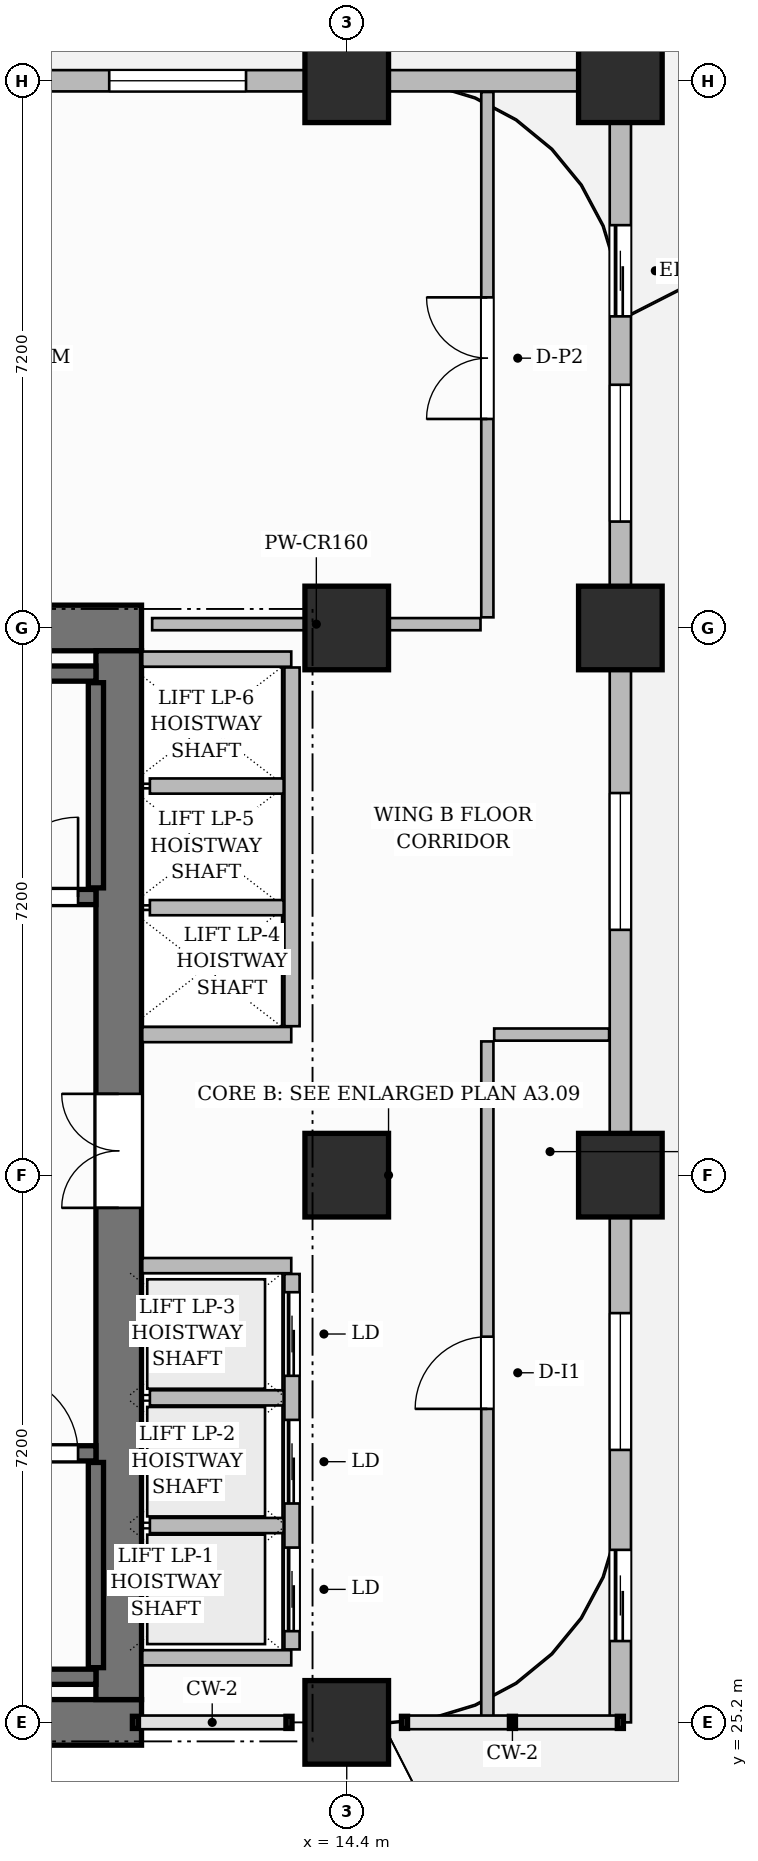
"""IFC4 building model, lengths in metres.
Left out: names, types, materials, properties, quantities, classifications, styles, units other than length and angle.
Written with IfcOpenShell. Run it as: python <this file> out.ifc"""

import sys

from ifc_helpers import new_model, si_unit, direction, frame, frame_2d, origin, origin_2d, place, context, subcontext, project, spatial, rectangle, extrude, source, transform, mapped, element, fill, save


model = new_model("IFC4")
c1 = context("Model", 3, precision=1e-05, world=origin(), true_north=direction((0.0, 1.0)))
c2 = subcontext(c1, "Body", "Model", "MODEL_VIEW")
j1 = project(units=[si_unit("LENGTHUNIT", "METRE"), si_unit("PLANEANGLEUNIT", "RADIAN")], contexts=[c1])
p1 = place(None, origin())
s1 = spatial("IfcSite", under=j1, at=p1, CompositionType="ELEMENT")
p2 = place(p1, origin())
s2 = spatial("IfcBuilding", under=s1, at=p2, CompositionType="ELEMENT")
p3 = place(p2, frame((0.0, 0.0, 58.3)))
s3 = spatial("IfcBuildingStorey", under=s2, at=p3, CompositionType="ELEMENT", Elevation=58.3)
for number, where, z_axis, x_axis in (
    (1, (3.3, 25.2, 0.0), (0.0, 0.0, 1.0), (1.0, 0.0, 0.0)),
    (2, (3.3, 39.6, 0.0), (0.0, 0.0, 1.0), (1.0, 0.0, 0.0)),
):
    element("IfcWall", number, at=place(p3, frame(where, z_axis=z_axis, x_axis=x_axis)), inside=s3, PredefinedType="SHEAR", context=c2, shape_type="SweptSolid", body=[
        extrude(rectangle(XDim=8.4, YDim=0.6, at=frame_2d((4.2, 0.0))), origin(), (0.0, 0.0, 1.0), 3.7),
    ])
p4 = place(p3, frame((11.4, 25.5, 0.0), z_axis=(0.0, 0.0, 1.0), x_axis=(0.0, 1.0, 0.0)))
e3 = element("IfcWall", 3, at=p4, inside=s3, PredefinedType="SHEAR", context=c2, shape_type="SweptSolid", body=[
    extrude(rectangle(XDim=13.8, YDim=0.6, at=frame_2d((6.9, 0.0))), origin(), (0.0, 0.0, 1.0), 3.7),
])
p5 = place(p4, frame((6.47, 0.0, 0.0)))
e4 = element("IfcOpeningElement", 4, at=p5, cuts=e3, PredefinedType="OPENING", context=c2, shape_type="SweptSolid", body=[
    extrude(rectangle(XDim=1.5, YDim=2.2, at=frame_2d((0.75, 1.1))), frame((0.0, 0.31, 0.0), z_axis=(0.0, -1.0, 0.0), x_axis=(1.0, 0.0, 0.0)), (0.0, 0.0, 1.0), 0.62),
])
m1 = source(origin(), c2, "Body", "SweptSolid", [
    extrude(rectangle(XDim=1.1, YDim=1.1, at=origin_2d()), origin(), (0.0, 0.0, 1.0), 3.7),
])
for number, where, z_axis, x_axis in (
    (5, (14.4, 25.2, 0.0), (0.0, 0.0, 1.0), (1.0, 0.0, 0.0)),
    (6, (14.4, 32.4, 0.0), (0.0, 0.0, 1.0), (1.0, 0.0, 0.0)),
    (7, (14.4, 39.6, 0.0), (0.0, 0.0, 1.0), (1.0, 0.0, 0.0)),
    (8, (14.4, 46.8, 0.0), (0.0, 0.0, 1.0), (1.0, 0.0, 0.0)),
    (9, (18.0, 32.4, 0.0), (0.0, 0.0, 1.0), (1.0, 0.0, 0.0)),
    (10, (18.0, 39.6, 0.0), (0.0, 0.0, 1.0), (1.0, 0.0, 0.0)),
    (11, (18.0, 46.8, 0.0), (0.0, 0.0, 1.0), (1.0, 0.0, 0.0)),
):
    element("IfcColumn", number, at=place(p3, frame(where, z_axis=z_axis, x_axis=x_axis)), inside=s3, PredefinedType="COLUMN", context=c2, shape_type="MappedRepresentation", body=[
        mapped(m1, transform((0.0, 0.0, 0.0), scale=1.0)),
    ])
p6 = place(p3, frame((4.0, 25.8, 0.0), z_axis=(0.0, 0.0, 1.0), x_axis=(1.0, 0.0, 0.0)))
e12 = element("IfcWall", 12, at=p6, inside=s3, PredefinedType="SHEAR", context=c2, shape_type="SweptSolid", body=[
    extrude(rectangle(XDim=7.1, YDim=0.2, at=frame_2d((3.55, 0.0))), origin(), (0.0, 0.0, 1.0), 3.7),
])
p7 = place(p3, frame((11.1, 25.92, 0.0), z_axis=(0.0, 0.0, 1.0), x_axis=(0.0, 1.0, 0.0)))
e13 = element("IfcWall", 13, at=p7, inside=s3, PredefinedType="SHEAR", context=c2, shape_type="SweptSolid", body=[
    extrude(rectangle(XDim=2.7, YDim=0.2, at=frame_2d((1.35, 0.0))), origin(), (0.0, 0.0, 1.0), 3.7),
])
p8 = place(p3, frame((4.0, 28.74, 0.0), z_axis=(0.0, 0.0, 1.0), x_axis=(1.0, 0.0, 0.0)))
e14 = element("IfcWall", 14, at=p8, inside=s3, PredefinedType="SHEAR", context=c2, shape_type="SweptSolid", body=[
    extrude(rectangle(XDim=7.1, YDim=0.2, at=frame_2d((3.55, 0.0))), origin(), (0.0, 0.0, 1.0), 3.7),
])
p9 = place(p8, frame((5.815, 0.0, 0.0)))
e15 = element("IfcOpeningElement", 15, at=p9, cuts=e14, PredefinedType="OPENING", context=c2, shape_type="SweptSolid", body=[
    extrude(rectangle(XDim=1.05, YDim=2.2, at=frame_2d((0.525, 1.1))), frame((0.0, 0.11, 0.0), z_axis=(0.0, -1.0, 0.0), x_axis=(1.0, 0.0, 0.0)), (0.0, 0.0, 1.0), 0.22),
])
p10 = place(p3, frame((4.0, 39.0, 0.0), z_axis=(0.0, 0.0, 1.0), x_axis=(1.0, 0.0, 0.0)))
e16 = element("IfcWall", 16, at=p10, inside=s3, PredefinedType="SHEAR", context=c2, shape_type="SweptSolid", body=[
    extrude(rectangle(XDim=7.1, YDim=0.2, at=frame_2d((3.55, 0.0))), origin(), (0.0, 0.0, 1.0), 3.7),
])
p11 = place(p3, frame((11.1, 36.18, 0.0), z_axis=(0.0, 0.0, 1.0), x_axis=(0.0, 1.0, 0.0)))
e17 = element("IfcWall", 17, at=p11, inside=s3, PredefinedType="SHEAR", context=c2, shape_type="SweptSolid", body=[
    extrude(rectangle(XDim=2.7, YDim=0.2, at=frame_2d((1.35, 0.0))), origin(), (0.0, 0.0, 1.0), 3.7),
])
p12 = place(p3, frame((4.0, 36.06, 0.0), z_axis=(0.0, 0.0, 1.0), x_axis=(1.0, 0.0, 0.0)))
e18 = element("IfcWall", 18, at=p12, inside=s3, PredefinedType="SHEAR", context=c2, shape_type="SweptSolid", body=[
    extrude(rectangle(XDim=7.1, YDim=0.2, at=frame_2d((3.55, 0.0))), origin(), (0.0, 0.0, 1.0), 3.7),
])
p13 = place(p12, frame((5.815, 0.0, 0.0)))
e19 = element("IfcOpeningElement", 19, at=p13, cuts=e18, PredefinedType="OPENING", context=c2, shape_type="SweptSolid", body=[
    extrude(rectangle(XDim=1.05, YDim=2.2, at=frame_2d((0.525, 1.1))), frame((0.0, 0.11, 0.0), z_axis=(0.0, -1.0, 0.0), x_axis=(1.0, 0.0, 0.0)), (0.0, 0.0, 1.0), 0.22),
])
for number, where, z_axis, x_axis in (
    (20, (11.71, 26.05, 0.0), (0.0, 0.0, 1.0), (1.0, 0.0, 0.0)),
    (21, (11.71, 31.21, 0.0), (0.0, 0.0, 1.0), (1.0, 0.0, 0.0)),
):
    element("IfcWall", number, at=place(p3, frame(where, z_axis=z_axis, x_axis=x_axis)), inside=s3, PredefinedType="PARTITIONING", context=c2, shape_type="SweptSolid", body=[
        extrude(rectangle(XDim=1.96, YDim=0.2, at=frame_2d((0.98, 0.0))), origin(), (0.0, 0.0, 1.0), 3.45),
    ])
p14 = place(p3, frame((13.68, 26.16, 0.0), z_axis=(0.0, 0.0, 1.0), x_axis=(0.0, 1.0, 0.0)))
e22 = element("IfcWall", 22, at=p14, inside=s3, PredefinedType="PARTITIONING", context=c2, shape_type="SweptSolid", body=[
    extrude(rectangle(XDim=4.94, YDim=0.2, at=frame_2d((2.47, 0.0))), origin(), (0.0, 0.0, 1.0), 3.45),
])
p15 = place(p14, frame((0.24, 0.0, 0.0)))
e23 = element("IfcOpeningElement", 23, at=p15, cuts=e22, PredefinedType="OPENING", context=c2, shape_type="SweptSolid", body=[
    extrude(rectangle(XDim=1.1, YDim=2.2, at=frame_2d((0.55, 1.1))), frame((0.0, 0.11, 0.0), z_axis=(0.0, -1.0, 0.0), x_axis=(1.0, 0.0, 0.0)), (0.0, 0.0, 1.0), 0.22),
])
p16 = place(p14, frame((1.92, 0.0, 0.0)))
e24 = element("IfcOpeningElement", 24, at=p16, cuts=e22, PredefinedType="OPENING", context=c2, shape_type="SweptSolid", body=[
    extrude(rectangle(XDim=1.1, YDim=2.2, at=frame_2d((0.55, 1.1))), frame((0.0, 0.11, 0.0), z_axis=(0.0, -1.0, 0.0), x_axis=(1.0, 0.0, 0.0)), (0.0, 0.0, 1.0), 0.22),
])
p17 = place(p14, frame((3.6, 0.0, 0.0)))
e25 = element("IfcOpeningElement", 25, at=p17, cuts=e22, PredefinedType="OPENING", context=c2, shape_type="SweptSolid", body=[
    extrude(rectangle(XDim=1.1, YDim=2.2, at=frame_2d((0.55, 1.1))), frame((0.0, 0.11, 0.0), z_axis=(0.0, -1.0, 0.0), x_axis=(1.0, 0.0, 0.0)), (0.0, 0.0, 1.0), 0.22),
])
for number, where, z_axis, x_axis in (
    (26, (11.81, 27.79, 0.0), (0.0, 0.0, 1.0), (1.0, 0.0, 0.0)),
    (27, (11.81, 29.47, 0.0), (0.0, 0.0, 1.0), (1.0, 0.0, 0.0)),
):
    element("IfcWall", number, at=place(p3, frame(where, z_axis=z_axis, x_axis=x_axis)), inside=s3, PredefinedType="PARTITIONING", context=c2, shape_type="SweptSolid", body=[
        extrude(rectangle(XDim=1.76, YDim=0.2, at=frame_2d((0.88, 0.0))), origin(), (0.0, 0.0, 1.0), 3.45),
    ])
for number, where, z_axis, x_axis in (
    (28, (11.71, 34.25, 0.0), (0.0, 0.0, 1.0), (1.0, 0.0, 0.0)),
    (29, (11.71, 39.19, 0.0), (0.0, 0.0, 1.0), (1.0, 0.0, 0.0)),
):
    element("IfcWall", number, at=place(p3, frame(where, z_axis=z_axis, x_axis=x_axis)), inside=s3, PredefinedType="PARTITIONING", context=c2, shape_type="SweptSolid", body=[
        extrude(rectangle(XDim=1.96, YDim=0.2, at=frame_2d((0.98, 0.0))), origin(), (0.0, 0.0, 1.0), 3.45),
    ])
p18 = place(p3, frame((13.68, 34.36, 0.0), z_axis=(0.0, 0.0, 1.0), x_axis=(0.0, 1.0, 0.0)))
e30 = element("IfcWall", 30, at=p18, inside=s3, PredefinedType="PARTITIONING", context=c2, shape_type="SweptSolid", body=[
    extrude(rectangle(XDim=4.72, YDim=0.2, at=frame_2d((2.36, 0.0))), origin(), (0.0, 0.0, 1.0), 3.45),
])
for number, where, z_axis, x_axis in (
    (31, (11.81, 35.92, 0.0), (0.0, 0.0, 1.0), (1.0, 0.0, 0.0)),
    (32, (11.81, 37.52, 0.0), (0.0, 0.0, 1.0), (1.0, 0.0, 0.0)),
):
    element("IfcWall", number, at=place(p3, frame(where, z_axis=z_axis, x_axis=x_axis)), inside=s3, PredefinedType="PARTITIONING", context=c2, shape_type="SweptSolid", body=[
        extrude(rectangle(XDim=1.76, YDim=0.2, at=frame_2d((0.88, 0.0))), origin(), (0.0, 0.0, 1.0), 3.45),
    ])
p19 = place(p3, frame((16.25, 25.228, 0.0), z_axis=(0.0, 0.0, 1.0), x_axis=(0.0, 1.0, 0.0)))
e33 = element("IfcWall", 33, at=p19, inside=s3, PredefinedType="PARTITIONING", context=c2, shape_type="SweptSolid", body=[
    extrude(rectangle(XDim=8.932, YDim=0.16, at=frame_2d((4.466, 0.0))), origin(), (0.0, 0.0, 1.0), 3.45),
])
p20 = place(p19, frame((4.097, 0.0, 0.0)))
e34 = element("IfcOpeningElement", 34, at=p20, cuts=e33, PredefinedType="OPENING", context=c2, shape_type="SweptSolid", body=[
    extrude(rectangle(XDim=0.95, YDim=2.15, at=frame_2d((0.475, 1.075))), frame((0.0, 0.09, 0.0), z_axis=(0.0, -1.0, 0.0), x_axis=(1.0, 0.0, 0.0)), (0.0, 0.0, 1.0), 0.18),
])
p21 = place(p3, frame((16.34, 34.25, 0.0), z_axis=(0.0, 0.0, 1.0), x_axis=(1.0, 0.0, 0.0)))
e35 = element("IfcWall", 35, at=p21, inside=s3, PredefinedType="PARTITIONING", context=c2, shape_type="SweptSolid", body=[
    extrude(rectangle(XDim=1.512, YDim=0.16, at=frame_2d((0.756, 0.0))), origin(), (0.0, 0.0, 1.0), 3.45),
])
p22 = place(p3, frame((16.25, 39.74, 0.0), z_axis=(0.0, 0.0, 1.0), x_axis=(0.0, 1.0, 0.0)))
e36 = element("IfcWall", 36, at=p22, inside=s3, PredefinedType="PARTITIONING", context=c2, shape_type="SweptSolid", body=[
    extrude(rectangle(XDim=6.912, YDim=0.16, at=frame_2d((3.456, 0.0))), origin(), (0.0, 0.0, 1.0), 3.45),
])
p23 = place(p22, frame((2.61, 0.0, 0.0)))
e37 = element("IfcOpeningElement", 37, at=p23, cuts=e36, PredefinedType="OPENING", context=c2, shape_type="SweptSolid", body=[
    extrude(rectangle(XDim=1.6, YDim=2.4, at=frame_2d((0.8, 1.2))), frame((0.0, 0.09, 0.0), z_axis=(0.0, -1.0, 0.0), x_axis=(1.0, 0.0, 0.0)), (0.0, 0.0, 1.0), 0.18),
])
p24 = place(p3, frame((11.84, 39.65, 0.0), z_axis=(0.0, 0.0, 1.0), x_axis=(1.0, 0.0, 0.0)))
e38 = element("IfcWall", 38, at=p24, inside=s3, PredefinedType="PARTITIONING", context=c2, shape_type="SweptSolid", body=[
    extrude(rectangle(XDim=4.32, YDim=0.16, at=frame_2d((2.16, 0.0))), origin(), (0.0, 0.0, 1.0), 2.885),
])
p25 = place(p3, frame((18.0, 25.2, 0.0), z_axis=(0.0, 0.0, 1.0), x_axis=(0.0, 1.0, 0.0)))
e39 = element("IfcWall", 39, at=p25, inside=s3, PredefinedType="SOLIDWALL", context=c2, shape_type="SweptSolid", body=[
    extrude(rectangle(XDim=21.55, YDim=0.28, at=frame_2d((10.775, 0.0))), origin(), (0.0, 0.0, 1.0), 3.45),
])
p26 = place(p25, frame((18.5, 0.0, 0.0)))
e40 = element("IfcOpeningElement", 40, at=p26, cuts=e39, PredefinedType="OPENING", context=c2, shape_type="SweptSolid", body=[
    extrude(rectangle(XDim=1.2, YDim=2.2, at=frame_2d((0.6, 1.1))), frame((0.0, 0.15, 0.0), z_axis=(0.0, -1.0, 0.0), x_axis=(1.0, 0.0, 0.0)), (0.0, 0.0, 1.0), 0.3),
])
p27 = place(p25, frame((1.07, 0.0, 0.0)))
e41 = element("IfcOpeningElement", 41, at=p27, cuts=e39, PredefinedType="OPENING", context=c2, shape_type="SweptSolid", body=[
    extrude(rectangle(XDim=1.2, YDim=2.2, at=frame_2d((0.6, 1.1))), frame((0.0, 0.15, 0.0), z_axis=(0.0, -1.0, 0.0), x_axis=(1.0, 0.0, 0.0)), (0.0, 0.0, 1.0), 0.3),
])
p28 = place(p25, frame((3.585, 0.0, 0.8)))
e42 = element("IfcOpeningElement", 42, at=p28, cuts=e39, PredefinedType="OPENING", context=c2, shape_type="SweptSolid", body=[
    extrude(rectangle(XDim=1.8, YDim=1.85, at=frame_2d((0.9, 0.925))), frame((0.0, 0.15, 0.0), z_axis=(0.0, -1.0, 0.0), x_axis=(1.0, 0.0, 0.0)), (0.0, 0.0, 1.0), 0.3),
])
p29 = place(p25, frame((10.428, 0.0, 0.8)))
e43 = element("IfcOpeningElement", 43, at=p29, cuts=e39, PredefinedType="OPENING", context=c2, shape_type="SweptSolid", body=[
    extrude(rectangle(XDim=1.8, YDim=1.85, at=frame_2d((0.9, 0.925))), frame((0.0, 0.15, 0.0), z_axis=(0.0, -1.0, 0.0), x_axis=(1.0, 0.0, 0.0)), (0.0, 0.0, 1.0), 0.3),
])
p30 = place(p25, frame((15.8, 0.0, 0.8)))
e44 = element("IfcOpeningElement", 44, at=p30, cuts=e39, PredefinedType="OPENING", context=c2, shape_type="SweptSolid", body=[
    extrude(rectangle(XDim=1.8, YDim=1.85, at=frame_2d((0.9, 0.925))), frame((0.0, 0.15, 0.0), z_axis=(0.0, -1.0, 0.0), x_axis=(1.0, 0.0, 0.0)), (0.0, 0.0, 1.0), 0.3),
])
p31 = place(p3, frame((0.0, 46.8, 0.0), z_axis=(0.0, 0.0, 1.0), x_axis=(1.0, 0.0, 0.0)))
e45 = element("IfcWall", 45, at=p31, inside=s3, PredefinedType="SOLIDWALL", context=c2, shape_type="SweptSolid", body=[
    extrude(rectangle(XDim=18.0, YDim=0.28, at=frame_2d((9.0, 0.0))), origin(), (0.0, 0.0, 1.0), 2.885),
])
p32 = place(p31, frame((1.325, 0.0, 0.8)))
e46 = element("IfcOpeningElement", 46, at=p32, cuts=e45, PredefinedType="OPENING", context=c2, shape_type="SweptSolid", body=[
    extrude(rectangle(XDim=1.8, YDim=1.85, at=frame_2d((0.9, 0.925))), frame((0.0, 0.15, 0.0), z_axis=(0.0, -1.0, 0.0), x_axis=(1.0, 0.0, 0.0)), (0.0, 0.0, 1.0), 0.3),
])
p33 = place(p31, frame((4.075, 0.0, 0.8)))
e47 = element("IfcOpeningElement", 47, at=p33, cuts=e45, PredefinedType="OPENING", context=c2, shape_type="SweptSolid", body=[
    extrude(rectangle(XDim=1.8, YDim=1.85, at=frame_2d((0.9, 0.925))), frame((0.0, 0.15, 0.0), z_axis=(0.0, -1.0, 0.0), x_axis=(1.0, 0.0, 0.0)), (0.0, 0.0, 1.0), 0.3),
])
p34 = place(p31, frame((8.525, 0.0, 0.8)))
e48 = element("IfcOpeningElement", 48, at=p34, cuts=e45, PredefinedType="OPENING", context=c2, shape_type="SweptSolid", body=[
    extrude(rectangle(XDim=1.8, YDim=1.85, at=frame_2d((0.9, 0.925))), frame((0.0, 0.15, 0.0), z_axis=(0.0, -1.0, 0.0), x_axis=(1.0, 0.0, 0.0)), (0.0, 0.0, 1.0), 0.3),
])
p35 = place(p31, frame((11.275, 0.0, 0.8)))
e49 = element("IfcOpeningElement", 49, at=p35, cuts=e45, PredefinedType="OPENING", context=c2, shape_type="SweptSolid", body=[
    extrude(rectangle(XDim=1.8, YDim=1.85, at=frame_2d((0.9, 0.925))), frame((0.0, 0.15, 0.0), z_axis=(0.0, -1.0, 0.0), x_axis=(1.0, 0.0, 0.0)), (0.0, 0.0, 1.0), 0.3),
])
m2 = source(origin(), c2, "Body", "SweptSolid", [
    extrude(rectangle(XDim=1.05, YDim=2.2, at=frame_2d((0.525, 1.1))), frame((0.0, 0.025, 0.0), z_axis=(0.0, -1.0, 0.0), x_axis=(1.0, 0.0, 0.0)), (0.0, 0.0, 1.0), 0.05),
])
p36 = place(p9, origin())
e50 = element("IfcDoor", 50, at=p36, inside=s3, OperationType="SINGLE_SWING_LEFT", PredefinedType="DOOR", context=c2, shape_type="MappedRepresentation", body=[
    mapped(m2, transform((0.0, 0.0, 0.0), scale=1.0)),
])
fill(e15, e50)
p37 = place(p13, origin())
e51 = element("IfcDoor", 51, at=p37, inside=s3, OperationType="SINGLE_SWING_RIGHT", PredefinedType="DOOR", context=c2, shape_type="MappedRepresentation", body=[
    mapped(m2, transform((0.0, 0.0, 0.0), scale=1.0)),
])
fill(e19, e51)
m3 = source(origin(), c2, "Body", "SweptSolid", [
    extrude(rectangle(XDim=1.5, YDim=2.2, at=frame_2d((0.75, 1.1))), frame((0.0, 0.025, 0.0), z_axis=(0.0, -1.0, 0.0), x_axis=(1.0, 0.0, 0.0)), (0.0, 0.0, 1.0), 0.05),
])
p38 = place(p5, origin())
e52 = element("IfcDoor", 52, at=p38, inside=s3, OperationType="DOUBLE_DOOR_SINGLE_SWING", PredefinedType="DOOR", context=c2, shape_type="MappedRepresentation", body=[
    mapped(m3, transform((0.0, 0.0, 0.0), scale=1.0)),
])
fill(e4, e52)
m4 = source(origin(), c2, "Body", "SweptSolid", [
    extrude(rectangle(XDim=0.95, YDim=2.15, at=frame_2d((0.475, 1.075))), frame((0.0, 0.025, 0.0), z_axis=(0.0, -1.0, 0.0), x_axis=(1.0, 0.0, 0.0)), (0.0, 0.0, 1.0), 0.05),
])
p39 = place(p20, origin())
e53 = element("IfcDoor", 53, at=p39, inside=s3, OperationType="SINGLE_SWING_LEFT", PredefinedType="DOOR", context=c2, shape_type="MappedRepresentation", body=[
    mapped(m4, transform((0.0, 0.0, 0.0), scale=1.0)),
])
fill(e34, e53)
m5 = source(origin(), c2, "Body", "SweptSolid", [
    extrude(rectangle(XDim=1.6, YDim=2.4, at=frame_2d((0.8, 1.2))), frame((0.0, 0.025, 0.0), z_axis=(0.0, -1.0, 0.0), x_axis=(1.0, 0.0, 0.0)), (0.0, 0.0, 1.0), 0.05),
])
p40 = place(p23, origin())
e54 = element("IfcDoor", 54, at=p40, inside=s3, OperationType="DOUBLE_DOOR_SINGLE_SWING", PredefinedType="DOOR", context=c2, shape_type="MappedRepresentation", body=[
    mapped(m5, transform((0.0, 0.0, 0.0), scale=1.0)),
])
fill(e37, e54)
m6 = source(origin(), c2, "Body", "SweptSolid", [
    extrude(rectangle(XDim=1.1, YDim=2.2, at=frame_2d((0.55, 1.1))), frame((0.0, 0.025, 0.0), z_axis=(0.0, -1.0, 0.0), x_axis=(1.0, 0.0, 0.0)), (0.0, 0.0, 1.0), 0.05),
])
p41 = place(p15, origin())
e55 = element("IfcDoor", 55, at=p41, inside=s3, OperationType="SLIDING_TO_LEFT", PredefinedType="DOOR", context=c2, shape_type="MappedRepresentation", body=[
    mapped(m6, transform((0.0, 0.0, 0.0), scale=1.0)),
])
fill(e23, e55)
p42 = place(p16, origin())
e56 = element("IfcDoor", 56, at=p42, inside=s3, OperationType="SLIDING_TO_LEFT", PredefinedType="DOOR", context=c2, shape_type="MappedRepresentation", body=[
    mapped(m6, transform((0.0, 0.0, 0.0), scale=1.0)),
])
fill(e24, e56)
p43 = place(p17, origin())
e57 = element("IfcDoor", 57, at=p43, inside=s3, OperationType="SLIDING_TO_LEFT", PredefinedType="DOOR", context=c2, shape_type="MappedRepresentation", body=[
    mapped(m6, transform((0.0, 0.0, 0.0), scale=1.0)),
])
fill(e25, e57)
m7 = source(origin(), c2, "Body", "SweptSolid", [
    extrude(rectangle(XDim=1.2, YDim=2.2, at=frame_2d((0.6, 1.1))), frame((0.0, 0.025, 0.0), z_axis=(0.0, -1.0, 0.0), x_axis=(1.0, 0.0, 0.0)), (0.0, 0.0, 1.0), 0.05),
])
p44 = place(p26, origin())
e58 = element("IfcDoor", 58, at=p44, inside=s3, OperationType="SLIDING_TO_LEFT", PredefinedType="DOOR", context=c2, shape_type="MappedRepresentation", body=[
    mapped(m7, transform((0.0, 0.0, 0.0), scale=1.0)),
])
fill(e40, e58)
p45 = place(p27, origin())
e59 = element("IfcDoor", 59, at=p45, inside=s3, OperationType="SLIDING_TO_LEFT", PredefinedType="DOOR", context=c2, shape_type="MappedRepresentation", body=[
    mapped(m7, transform((0.0, 0.0, 0.0), scale=1.0)),
])
fill(e41, e59)
m8 = source(origin(), c2, "Body", "SweptSolid", [
    extrude(rectangle(XDim=1.8, YDim=1.85, at=frame_2d((0.9, 0.925))), frame((0.0, 0.03, 0.0), z_axis=(0.0, -1.0, 0.0), x_axis=(1.0, 0.0, 0.0)), (0.0, 0.0, 1.0), 0.06),
])
p46 = place(p28, origin())
e60 = element("IfcWindow", 60, at=p46, inside=s3, PartitioningType="DOUBLE_PANEL_VERTICAL", PredefinedType="WINDOW", context=c2, shape_type="MappedRepresentation", body=[
    mapped(m8, transform((0.0, 0.0, 0.0), scale=1.0)),
])
fill(e42, e60)
p47 = place(p29, origin())
e61 = element("IfcWindow", 61, at=p47, inside=s3, PartitioningType="DOUBLE_PANEL_VERTICAL", PredefinedType="WINDOW", context=c2, shape_type="MappedRepresentation", body=[
    mapped(m8, transform((0.0, 0.0, 0.0), scale=1.0)),
])
fill(e43, e61)
p48 = place(p30, origin())
e62 = element("IfcWindow", 62, at=p48, inside=s3, PartitioningType="DOUBLE_PANEL_VERTICAL", PredefinedType="WINDOW", context=c2, shape_type="MappedRepresentation", body=[
    mapped(m8, transform((0.0, 0.0, 0.0), scale=1.0)),
])
fill(e44, e62)
p49 = place(p35, origin())
e63 = element("IfcWindow", 63, at=p49, inside=s3, PartitioningType="DOUBLE_PANEL_VERTICAL", PredefinedType="WINDOW", context=c2, shape_type="MappedRepresentation", body=[
    mapped(m8, transform((0.0, 0.0, 0.0), scale=1.0)),
])
fill(e49, e63)
save(model, sys.argv[1])
